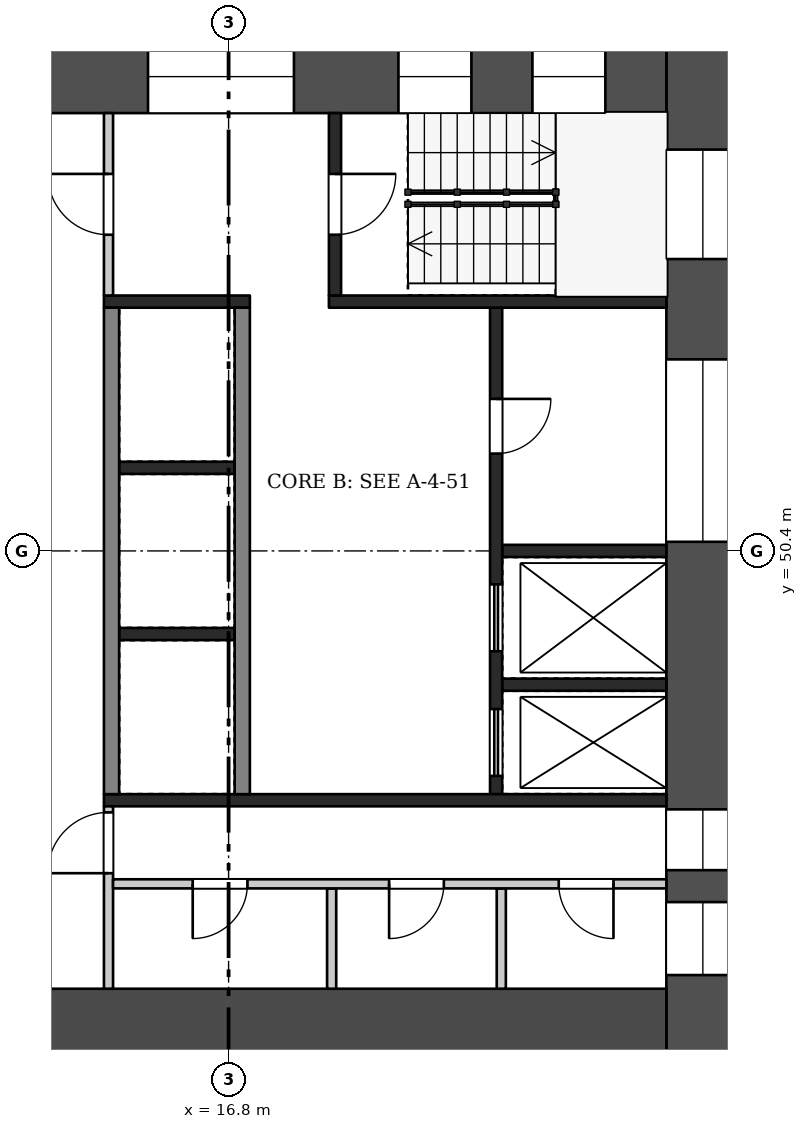
"""IFC4 building model, lengths in metres.
Left out: names, types, materials, properties, quantities, classifications, styles, units other than length and angle.
Written with IfcOpenShell. Run it as: python <this file> out.ifc"""

import sys

from ifc_helpers import new_model, si_unit, direction, frame, frame_2d, origin, place, context, subcontext, project, spatial, rectangle, extrude, element, fill, save


model = new_model("IFC4")
c1 = context("Model", 3, precision=1e-05, world=origin(), true_north=direction((0.0, 1.0)))
c2 = subcontext(c1, "Body", "Model", "MODEL_VIEW")
j1 = project(units=[si_unit("LENGTHUNIT", "METRE"), si_unit("PLANEANGLEUNIT", "RADIAN")], contexts=[c1])
p1 = place(None, origin())
s1 = spatial("IfcSite", under=j1, at=p1, CompositionType="ELEMENT")
p2 = place(p1, origin())
s2 = spatial("IfcBuilding", under=s1, at=p2, CompositionType="ELEMENT")
p3 = place(p2, frame((0.0, 0.0, 81.2)))
s3 = spatial("IfcBuildingStorey", under=s2, at=p3, CompositionType="ELEMENT", Elevation=81.2)
p4 = place(p3, frame((24.6, 58.8, 0.0), z_axis=(0.0, 0.0, 1.0), x_axis=(0.0, -1.0, 0.0)))
e1 = element("IfcWall", 1, at=p4, inside=s3, PredefinedType="SHEAR", context=c2, shape_type="SweptSolid", body=[
    extrude(rectangle(XDim=16.8, YDim=1.2, at=frame_2d((8.4, 0.0))), origin(), (0.0, 0.0, 1.0), 3.22),
])
p5 = place(p4, frame((1.8, 0.0, 0.5)))
e2 = element("IfcOpeningElement", 2, at=p5, cuts=e1, PredefinedType="OPENING", context=c2, shape_type="SweptSolid", body=[
    extrude(rectangle(XDim=1.8, YDim=2.4, at=frame_2d((0.9, 1.2))), frame((0.0, 0.61, 0.0), z_axis=(0.0, -1.0, 0.0), x_axis=(1.0, 0.0, 0.0)), (0.0, 0.0, 1.0), 1.22),
])
p6 = place(p4, frame((5.25, 0.0, 1.6)))
e3 = element("IfcOpeningElement", 3, at=p6, cuts=e1, PredefinedType="OPENING", context=c2, shape_type="SweptSolid", body=[
    extrude(rectangle(XDim=3.0, YDim=1.2, at=frame_2d((1.5, 0.6))), frame((0.0, 0.61, 0.0), z_axis=(0.0, -1.0, 0.0), x_axis=(1.0, 0.0, 0.0)), (0.0, 0.0, 1.0), 1.22),
])
p7 = place(p4, frame((12.65, 0.0, 0.6)))
e4 = element("IfcOpeningElement", 4, at=p7, cuts=e1, PredefinedType="OPENING", context=c2, shape_type="SweptSolid", body=[
    extrude(rectangle(XDim=1.0, YDim=2.1, at=frame_2d((0.5, 1.05))), frame((0.0, 0.61, 0.0), z_axis=(0.0, -1.0, 0.0), x_axis=(1.0, 0.0, 0.0)), (0.0, 0.0, 1.0), 1.22),
])
p8 = place(p4, frame((14.175, 0.0, 1.6)))
e5 = element("IfcOpeningElement", 5, at=p8, cuts=e1, PredefinedType="OPENING", context=c2, shape_type="SweptSolid", body=[
    extrude(rectangle(XDim=1.2, YDim=1.2, at=frame_2d((0.6, 0.6))), frame((0.0, 0.61, 0.0), z_axis=(0.0, -1.0, 0.0), x_axis=(1.0, 0.0, 0.0)), (0.0, 0.0, 1.0), 1.22),
])
p9 = place(p3, frame((9.6, 58.2, 0.0), z_axis=(0.0, 0.0, 1.0), x_axis=(1.0, 0.0, 0.0)))
e6 = element("IfcWall", 6, at=p9, inside=s3, PredefinedType="SHEAR", context=c2, shape_type="SweptSolid", body=[
    extrude(rectangle(XDim=14.4, YDim=1.2, at=frame_2d((7.2, 0.0))), origin(), (0.0, 0.0, 1.0), 3.22),
])
p10 = place(p9, frame((1.105, 0.0, 0.6)))
e7 = element("IfcOpeningElement", 7, at=p10, cuts=e6, PredefinedType="OPENING", context=c2, shape_type="SweptSolid", body=[
    extrude(rectangle(XDim=3.0, YDim=2.1, at=frame_2d((1.5, 1.05))), frame((0.0, 0.61, 0.0), z_axis=(0.0, -1.0, 0.0), x_axis=(1.0, 0.0, 0.0)), (0.0, 0.0, 1.0), 1.22),
])
p11 = place(p9, frame((5.875, 0.0, 0.6)))
e8 = element("IfcOpeningElement", 8, at=p11, cuts=e6, PredefinedType="OPENING", context=c2, shape_type="SweptSolid", body=[
    extrude(rectangle(XDim=2.4, YDim=2.1, at=frame_2d((1.2, 1.05))), frame((0.0, 0.61, 0.0), z_axis=(0.0, -1.0, 0.0), x_axis=(1.0, 0.0, 0.0)), (0.0, 0.0, 1.0), 1.22),
])
p12 = place(p9, frame((9.993, 0.0, 0.5)))
e9 = element("IfcOpeningElement", 9, at=p12, cuts=e6, PredefinedType="OPENING", context=c2, shape_type="SweptSolid", body=[
    extrude(rectangle(XDim=1.2, YDim=2.4, at=frame_2d((0.6, 1.2))), frame((0.0, 0.61, 0.0), z_axis=(0.0, -1.0, 0.0), x_axis=(1.0, 0.0, 0.0)), (0.0, 0.0, 1.0), 1.22),
])
p13 = place(p9, frame((12.197, 0.0, 0.5)))
e10 = element("IfcOpeningElement", 10, at=p13, cuts=e6, PredefinedType="OPENING", context=c2, shape_type="SweptSolid", body=[
    extrude(rectangle(XDim=1.2, YDim=2.4, at=frame_2d((0.6, 1.2))), frame((0.0, 0.61, 0.0), z_axis=(0.0, -1.0, 0.0), x_axis=(1.0, 0.0, 0.0)), (0.0, 0.0, 1.0), 1.22),
])
p14 = place(p3, frame((9.6, 42.6, 0.0), z_axis=(0.0, 0.0, 1.0), x_axis=(1.0, 0.0, 0.0)))
e11 = element("IfcWall", 11, at=p14, inside=s3, PredefinedType="SHEAR", context=c2, shape_type="SweptSolid", body=[
    extrude(rectangle(XDim=14.4, YDim=1.2, at=frame_2d((7.2, 0.0))), origin(), (0.0, 0.0, 1.0), 3.22),
])
p15 = place(p14, frame((2.1, 0.0, 0.0)))
e12 = element("IfcOpeningElement", 12, at=p15, cuts=e11, PredefinedType="OPENING", context=c2, shape_type="SweptSolid", body=[
    extrude(rectangle(XDim=1.8, YDim=2.1, at=frame_2d((0.9, 1.05))), frame((0.0, 0.61, 0.0), z_axis=(0.0, -1.0, 0.0), x_axis=(1.0, 0.0, 0.0)), (0.0, 0.0, 1.0), 1.22),
])
for number, where, z_axis, x_axis in (
    (13, (15.0, 51.767, 0.0), (0.0, 0.0, 1.0), (1.0, 0.0, 0.0)),
    (14, (15.0, 49.033, 0.0), (0.0, 0.0, 1.0), (1.0, 0.0, 0.0)),
):
    element("IfcWall", number, at=place(p3, frame(where, z_axis=z_axis, x_axis=x_axis)), inside=s3, PredefinedType="SHEAR", context=c2, shape_type="SweptSolid", body=[
        extrude(rectangle(XDim=1.9, YDim=0.2, at=frame_2d((0.95, 0.0))), origin(), (0.0, 0.0, 1.0), 3.22),
    ])
for number, where, z_axis, x_axis in (
    (15, (14.875, 54.4, 0.0), (0.0, 0.0, 1.0), (0.0, -1.0, 0.0)),
    (16, (17.025, 54.4, 0.0), (0.0, 0.0, 1.0), (0.0, -1.0, 0.0)),
):
    element("IfcWall", number, at=place(p3, frame(where, z_axis=z_axis, x_axis=x_axis)), inside=s3, PredefinedType="SHEAR", context=c2, shape_type="SweptSolid", body=[
        extrude(rectangle(XDim=8.0, YDim=0.25, at=frame_2d((4.0, 0.0))), origin(), (0.0, 0.0, 1.0), 3.22),
    ])
for number, where, z_axis, x_axis in (
    (17, (21.3, 50.4, 0.0), (0.0, 0.0, 1.0), (1.0, 0.0, 0.0)),
    (18, (21.3, 48.2, 0.0), (0.0, 0.0, 1.0), (1.0, 0.0, 0.0)),
):
    element("IfcWall", number, at=place(p3, frame(where, z_axis=z_axis, x_axis=x_axis)), inside=s3, PredefinedType="SHEAR", context=c2, shape_type="SweptSolid", body=[
        extrude(rectangle(XDim=2.7, YDim=0.2, at=frame_2d((1.35, 0.0))), origin(), (0.0, 0.0, 1.0), 3.22),
    ])
p16 = place(p3, frame((21.2, 54.4, 0.0), z_axis=(0.0, 0.0, 1.0), x_axis=(0.0, -1.0, 0.0)))
e19 = element("IfcWall", 19, at=p16, inside=s3, PredefinedType="SHEAR", context=c2, shape_type="SweptSolid", body=[
    extrude(rectangle(XDim=8.0, YDim=0.2, at=frame_2d((4.0, 0.0))), origin(), (0.0, 0.0, 1.0), 3.22),
])
p17 = place(p16, frame((1.5, 0.0, 0.0)))
e20 = element("IfcOpeningElement", 20, at=p17, cuts=e19, PredefinedType="OPENING", context=c2, shape_type="SweptSolid", body=[
    extrude(rectangle(XDim=0.9, YDim=2.1, at=frame_2d((0.45, 1.05))), frame((0.0, 0.11, 0.0), z_axis=(0.0, -1.0, 0.0), x_axis=(1.0, 0.0, 0.0)), (0.0, 0.0, 1.0), 0.22),
])
p18 = place(p16, frame((4.55, 0.0, 0.0)))
e21 = element("IfcOpeningElement", 21, at=p18, cuts=e19, PredefinedType="OPENING", context=c2, shape_type="SweptSolid", body=[
    extrude(rectangle(XDim=1.1, YDim=2.1, at=frame_2d((0.55, 1.05))), frame((0.0, 0.11, 0.0), z_axis=(0.0, -1.0, 0.0), x_axis=(1.0, 0.0, 0.0)), (0.0, 0.0, 1.0), 0.22),
])
p19 = place(p16, frame((6.6, 0.0, 0.0)))
e22 = element("IfcOpeningElement", 22, at=p19, cuts=e19, PredefinedType="OPENING", context=c2, shape_type="SweptSolid", body=[
    extrude(rectangle(XDim=1.1, YDim=2.1, at=frame_2d((0.55, 1.05))), frame((0.0, 0.11, 0.0), z_axis=(0.0, -1.0, 0.0), x_axis=(1.0, 0.0, 0.0)), (0.0, 0.0, 1.0), 0.22),
])
p20 = place(p3, frame((14.75, 54.5, 0.0), z_axis=(0.0, 0.0, 1.0), x_axis=(1.0, 0.0, 0.0)))
e23 = element("IfcWall", 23, at=p20, inside=s3, PredefinedType="SHEAR", context=c2, shape_type="SweptSolid", body=[
    extrude(rectangle(XDim=2.4, YDim=0.2, at=frame_2d((1.2, 0.0))), origin(), (0.0, 0.0, 1.0), 3.22),
])
p21 = place(p3, frame((18.45, 54.5, 0.0), z_axis=(0.0, 0.0, 1.0), x_axis=(1.0, 0.0, 0.0)))
e24 = element("IfcWall", 24, at=p21, inside=s3, PredefinedType="SHEAR", context=c2, shape_type="SweptSolid", body=[
    extrude(rectangle(XDim=5.55, YDim=0.2, at=frame_2d((2.775, 0.0))), origin(), (0.0, 0.0, 1.0), 3.22),
])
p22 = place(p3, frame((14.825, 57.6, 0.0), z_axis=(0.0, 0.0, 1.0), x_axis=(0.0, -1.0, 0.0)))
e25 = element("IfcWall", 25, at=p22, inside=s3, PredefinedType="PARTITIONING", context=c2, shape_type="SweptSolid", body=[
    extrude(rectangle(XDim=3.0, YDim=0.15, at=frame_2d((1.5, 0.0))), origin(), (0.0, 0.0, 1.0), 3.22),
])
p23 = place(p22, frame((1.0, 0.0, 0.0)))
e26 = element("IfcOpeningElement", 26, at=p23, cuts=e25, PredefinedType="OPENING", context=c2, shape_type="SweptSolid", body=[
    extrude(rectangle(XDim=1.0, YDim=2.1, at=frame_2d((0.5, 1.05))), frame((0.0, 0.085, 0.0), z_axis=(0.0, -1.0, 0.0), x_axis=(1.0, 0.0, 0.0)), (0.0, 0.0, 1.0), 0.17),
])
p24 = place(p3, frame((18.55, 57.6, 0.0), z_axis=(0.0, 0.0, 1.0), x_axis=(0.0, -1.0, 0.0)))
e27 = element("IfcWall", 27, at=p24, inside=s3, PredefinedType="SHEAR", context=c2, shape_type="SweptSolid", body=[
    extrude(rectangle(XDim=3.0, YDim=0.2, at=frame_2d((1.5, 0.0))), origin(), (0.0, 0.0, 1.0), 3.22),
])
p25 = place(p24, frame((1.0, 0.0, 0.0)))
e28 = element("IfcOpeningElement", 28, at=p25, cuts=e27, PredefinedType="OPENING", context=c2, shape_type="SweptSolid", body=[
    extrude(rectangle(XDim=1.0, YDim=2.1, at=frame_2d((0.5, 1.05))), frame((0.0, 0.11, 0.0), z_axis=(0.0, -1.0, 0.0), x_axis=(1.0, 0.0, 0.0)), (0.0, 0.0, 1.0), 0.22),
])
p26 = place(p3, frame((14.75, 46.3, 0.0), z_axis=(0.0, 0.0, 1.0), x_axis=(1.0, 0.0, 0.0)))
e29 = element("IfcWall", 29, at=p26, inside=s3, PredefinedType="SHEAR", context=c2, shape_type="SweptSolid", body=[
    extrude(rectangle(XDim=9.25, YDim=0.2, at=frame_2d((4.625, 0.0))), origin(), (0.0, 0.0, 1.0), 3.22),
])
p27 = place(p3, frame((14.825, 46.2, 0.0), z_axis=(0.0, 0.0, 1.0), x_axis=(0.0, -1.0, 0.0)))
e30 = element("IfcWall", 30, at=p27, inside=s3, PredefinedType="PARTITIONING", context=c2, shape_type="SweptSolid", body=[
    extrude(rectangle(XDim=3.0, YDim=0.15, at=frame_2d((1.5, 0.0))), origin(), (0.0, 0.0, 1.0), 3.22),
])
p28 = place(p27, frame((0.1, 0.0, 0.0)))
e31 = element("IfcOpeningElement", 31, at=p28, cuts=e30, PredefinedType="OPENING", context=c2, shape_type="SweptSolid", body=[
    extrude(rectangle(XDim=1.0, YDim=2.1, at=frame_2d((0.5, 1.05))), frame((0.0, 0.085, 0.0), z_axis=(0.0, -1.0, 0.0), x_axis=(1.0, 0.0, 0.0)), (0.0, 0.0, 1.0), 0.17),
])
for number, where, z_axis, x_axis in (
    (32, (18.495, 44.85, 0.0), (0.0, 0.0, 1.0), (0.0, -1.0, 0.0)),
    (33, (21.285, 44.85, 0.0), (0.0, 0.0, 1.0), (0.0, -1.0, 0.0)),
):
    element("IfcWall", number, at=place(p3, frame(where, z_axis=z_axis, x_axis=x_axis)), inside=s3, PredefinedType="PARTITIONING", context=c2, shape_type="SweptSolid", body=[
        extrude(rectangle(XDim=1.65, YDim=0.15, at=frame_2d((0.825, 0.0))), origin(), (0.0, 0.0, 1.0), 3.22),
    ])
p29 = place(p3, frame((14.9, 44.925, 0.0), z_axis=(0.0, 0.0, 1.0), x_axis=(1.0, 0.0, 0.0)))
e34 = element("IfcWall", 34, at=p29, inside=s3, PredefinedType="PARTITIONING", context=c2, shape_type="SweptSolid", body=[
    extrude(rectangle(XDim=9.1, YDim=0.15, at=frame_2d((4.55, 0.0))), origin(), (0.0, 0.0, 1.0), 3.22),
])
p30 = place(p29, frame((1.31, 0.0, 0.0)))
e35 = element("IfcOpeningElement", 35, at=p30, cuts=e34, PredefinedType="OPENING", context=c2, shape_type="SweptSolid", body=[
    extrude(rectangle(XDim=0.9, YDim=2.1, at=frame_2d((0.45, 1.05))), frame((0.0, 0.085, 0.0), z_axis=(0.0, -1.0, 0.0), x_axis=(1.0, 0.0, 0.0)), (0.0, 0.0, 1.0), 0.17),
])
p31 = place(p29, frame((4.54, 0.0, 0.0)))
e36 = element("IfcOpeningElement", 36, at=p31, cuts=e34, PredefinedType="OPENING", context=c2, shape_type="SweptSolid", body=[
    extrude(rectangle(XDim=0.9, YDim=2.1, at=frame_2d((0.45, 1.05))), frame((0.0, 0.085, 0.0), z_axis=(0.0, -1.0, 0.0), x_axis=(1.0, 0.0, 0.0)), (0.0, 0.0, 1.0), 0.17),
])
p32 = place(p29, frame((7.33, 0.0, 0.0)))
e37 = element("IfcOpeningElement", 37, at=p32, cuts=e34, PredefinedType="OPENING", context=c2, shape_type="SweptSolid", body=[
    extrude(rectangle(XDim=0.9, YDim=2.1, at=frame_2d((0.45, 1.05))), frame((0.0, 0.085, 0.0), z_axis=(0.0, -1.0, 0.0), x_axis=(1.0, 0.0, 0.0)), (0.0, 0.0, 1.0), 0.17),
])
p33 = place(p17, origin())
e38 = element("IfcDoor", 38, at=p33, inside=s3, OperationType="SINGLE_SWING_LEFT", PredefinedType="DOOR", context=c2, shape_type="SweptSolid", body=[
    extrude(rectangle(XDim=0.9, YDim=2.1, at=frame_2d((0.45, 1.05))), frame((0.0, 0.025, 0.0), z_axis=(0.0, -1.0, 0.0), x_axis=(1.0, 0.0, 0.0)), (0.0, 0.0, 1.0), 0.05),
])
fill(e20, e38)
p34 = place(p18, origin())
e39 = element("IfcDoor", 39, at=p34, inside=s3, OperationType="DOUBLE_DOOR_SLIDING", PredefinedType="DOOR", context=c2, shape_type="SweptSolid", body=[
    extrude(rectangle(XDim=1.1, YDim=2.1, at=frame_2d((0.55, 1.05))), frame((0.0, 0.025, 0.0), z_axis=(0.0, -1.0, 0.0), x_axis=(1.0, 0.0, 0.0)), (0.0, 0.0, 1.0), 0.05),
])
fill(e21, e39)
p35 = place(p19, origin())
e40 = element("IfcDoor", 40, at=p35, inside=s3, OperationType="DOUBLE_DOOR_SLIDING", PredefinedType="DOOR", context=c2, shape_type="SweptSolid", body=[
    extrude(rectangle(XDim=1.1, YDim=2.1, at=frame_2d((0.55, 1.05))), frame((0.0, 0.025, 0.0), z_axis=(0.0, -1.0, 0.0), x_axis=(1.0, 0.0, 0.0)), (0.0, 0.0, 1.0), 0.05),
])
fill(e22, e40)
p36 = place(p23, frame((1.0, 0.0, 0.0), z_axis=(0.0, 0.0, 1.0), x_axis=(-1.0, 0.0, 0.0)))
e41 = element("IfcDoor", 41, at=p36, inside=s3, OperationType="SINGLE_SWING_RIGHT", PredefinedType="DOOR", context=c2, shape_type="SweptSolid", body=[
    extrude(rectangle(XDim=1.0, YDim=2.1, at=frame_2d((0.5, 1.05))), frame((0.0, 0.025, 0.0), z_axis=(0.0, -1.0, 0.0), x_axis=(1.0, 0.0, 0.0)), (0.0, 0.0, 1.0), 0.05),
])
fill(e26, e41)
p37 = place(p25, origin())
e42 = element("IfcDoor", 42, at=p37, inside=s3, OperationType="SINGLE_SWING_LEFT", PredefinedType="DOOR", context=c2, shape_type="SweptSolid", body=[
    extrude(rectangle(XDim=1.0, YDim=2.1, at=frame_2d((0.5, 1.05))), frame((0.0, 0.025, 0.0), z_axis=(0.0, -1.0, 0.0), x_axis=(1.0, 0.0, 0.0)), (0.0, 0.0, 1.0), 0.05),
])
fill(e28, e42)
p38 = place(p28, frame((1.0, 0.0, 0.0), z_axis=(0.0, 0.0, 1.0), x_axis=(-1.0, 0.0, 0.0)))
e43 = element("IfcDoor", 43, at=p38, inside=s3, OperationType="SINGLE_SWING_LEFT", PredefinedType="DOOR", context=c2, shape_type="SweptSolid", body=[
    extrude(rectangle(XDim=1.0, YDim=2.1, at=frame_2d((0.5, 1.05))), frame((0.0, 0.025, 0.0), z_axis=(0.0, -1.0, 0.0), x_axis=(1.0, 0.0, 0.0)), (0.0, 0.0, 1.0), 0.05),
])
fill(e31, e43)
p39 = place(p30, frame((0.9, 0.0, 0.0), z_axis=(0.0, 0.0, 1.0), x_axis=(-1.0, 0.0, 0.0)))
e44 = element("IfcDoor", 44, at=p39, inside=s3, OperationType="SINGLE_SWING_RIGHT", PredefinedType="DOOR", context=c2, shape_type="SweptSolid", body=[
    extrude(rectangle(XDim=0.9, YDim=2.1, at=frame_2d((0.45, 1.05))), frame((0.0, 0.025, 0.0), z_axis=(0.0, -1.0, 0.0), x_axis=(1.0, 0.0, 0.0)), (0.0, 0.0, 1.0), 0.05),
])
fill(e35, e44)
p40 = place(p31, frame((0.9, 0.0, 0.0), z_axis=(0.0, 0.0, 1.0), x_axis=(-1.0, 0.0, 0.0)))
e45 = element("IfcDoor", 45, at=p40, inside=s3, OperationType="SINGLE_SWING_RIGHT", PredefinedType="DOOR", context=c2, shape_type="SweptSolid", body=[
    extrude(rectangle(XDim=0.9, YDim=2.1, at=frame_2d((0.45, 1.05))), frame((0.0, 0.025, 0.0), z_axis=(0.0, -1.0, 0.0), x_axis=(1.0, 0.0, 0.0)), (0.0, 0.0, 1.0), 0.05),
])
fill(e36, e45)
p41 = place(p32, frame((0.9, 0.0, 0.0), z_axis=(0.0, 0.0, 1.0), x_axis=(-1.0, 0.0, 0.0)))
e46 = element("IfcDoor", 46, at=p41, inside=s3, OperationType="SINGLE_SWING_LEFT", PredefinedType="DOOR", context=c2, shape_type="SweptSolid", body=[
    extrude(rectangle(XDim=0.9, YDim=2.1, at=frame_2d((0.45, 1.05))), frame((0.0, 0.025, 0.0), z_axis=(0.0, -1.0, 0.0), x_axis=(1.0, 0.0, 0.0)), (0.0, 0.0, 1.0), 0.05),
])
fill(e37, e46)
p42 = place(p5, origin())
e47 = element("IfcWindow", 47, at=p42, inside=s3, PartitioningType="SINGLE_PANEL", PredefinedType="WINDOW", context=c2, shape_type="SweptSolid", body=[
    extrude(rectangle(XDim=1.8, YDim=2.4, at=frame_2d((0.9, 1.2))), frame((0.0, 0.03, 0.0), z_axis=(0.0, -1.0, 0.0), x_axis=(1.0, 0.0, 0.0)), (0.0, 0.0, 1.0), 0.06),
])
fill(e2, e47)
p43 = place(p6, origin())
e48 = element("IfcWindow", 48, at=p43, inside=s3, PartitioningType="SINGLE_PANEL", PredefinedType="WINDOW", context=c2, shape_type="SweptSolid", body=[
    extrude(rectangle(XDim=3.0, YDim=1.2, at=frame_2d((1.5, 0.6))), frame((0.0, 0.03, 0.0), z_axis=(0.0, -1.0, 0.0), x_axis=(1.0, 0.0, 0.0)), (0.0, 0.0, 1.0), 0.06),
])
fill(e3, e48)
p44 = place(p7, origin())
e49 = element("IfcWindow", 49, at=p44, inside=s3, PartitioningType="SINGLE_PANEL", PredefinedType="WINDOW", context=c2, shape_type="SweptSolid", body=[
    extrude(rectangle(XDim=1.0, YDim=2.1, at=frame_2d((0.5, 1.05))), frame((0.0, 0.03, 0.0), z_axis=(0.0, -1.0, 0.0), x_axis=(1.0, 0.0, 0.0)), (0.0, 0.0, 1.0), 0.06),
])
fill(e4, e49)
p45 = place(p8, origin())
e50 = element("IfcWindow", 50, at=p45, inside=s3, PartitioningType="SINGLE_PANEL", PredefinedType="WINDOW", context=c2, shape_type="SweptSolid", body=[
    extrude(rectangle(XDim=1.2, YDim=1.2, at=frame_2d((0.6, 0.6))), frame((0.0, 0.03, 0.0), z_axis=(0.0, -1.0, 0.0), x_axis=(1.0, 0.0, 0.0)), (0.0, 0.0, 1.0), 0.06),
])
fill(e5, e50)
p46 = place(p11, origin())
e51 = element("IfcWindow", 51, at=p46, inside=s3, PartitioningType="SINGLE_PANEL", PredefinedType="WINDOW", context=c2, shape_type="SweptSolid", body=[
    extrude(rectangle(XDim=2.4, YDim=2.1, at=frame_2d((1.2, 1.05))), frame((0.0, 0.03, 0.0), z_axis=(0.0, -1.0, 0.0), x_axis=(1.0, 0.0, 0.0)), (0.0, 0.0, 1.0), 0.06),
])
fill(e8, e51)
p47 = place(p12, origin())
e52 = element("IfcWindow", 52, at=p47, inside=s3, PartitioningType="SINGLE_PANEL", PredefinedType="WINDOW", context=c2, shape_type="SweptSolid", body=[
    extrude(rectangle(XDim=1.2, YDim=2.4, at=frame_2d((0.6, 1.2))), frame((0.0, 0.03, 0.0), z_axis=(0.0, -1.0, 0.0), x_axis=(1.0, 0.0, 0.0)), (0.0, 0.0, 1.0), 0.06),
])
fill(e9, e52)
p48 = place(p13, origin())
e53 = element("IfcWindow", 53, at=p48, inside=s3, PartitioningType="SINGLE_PANEL", PredefinedType="WINDOW", context=c2, shape_type="SweptSolid", body=[
    extrude(rectangle(XDim=1.2, YDim=2.4, at=frame_2d((0.6, 1.2))), frame((0.0, 0.03, 0.0), z_axis=(0.0, -1.0, 0.0), x_axis=(1.0, 0.0, 0.0)), (0.0, 0.0, 1.0), 0.06),
])
fill(e10, e53)
save(model, sys.argv[1])
